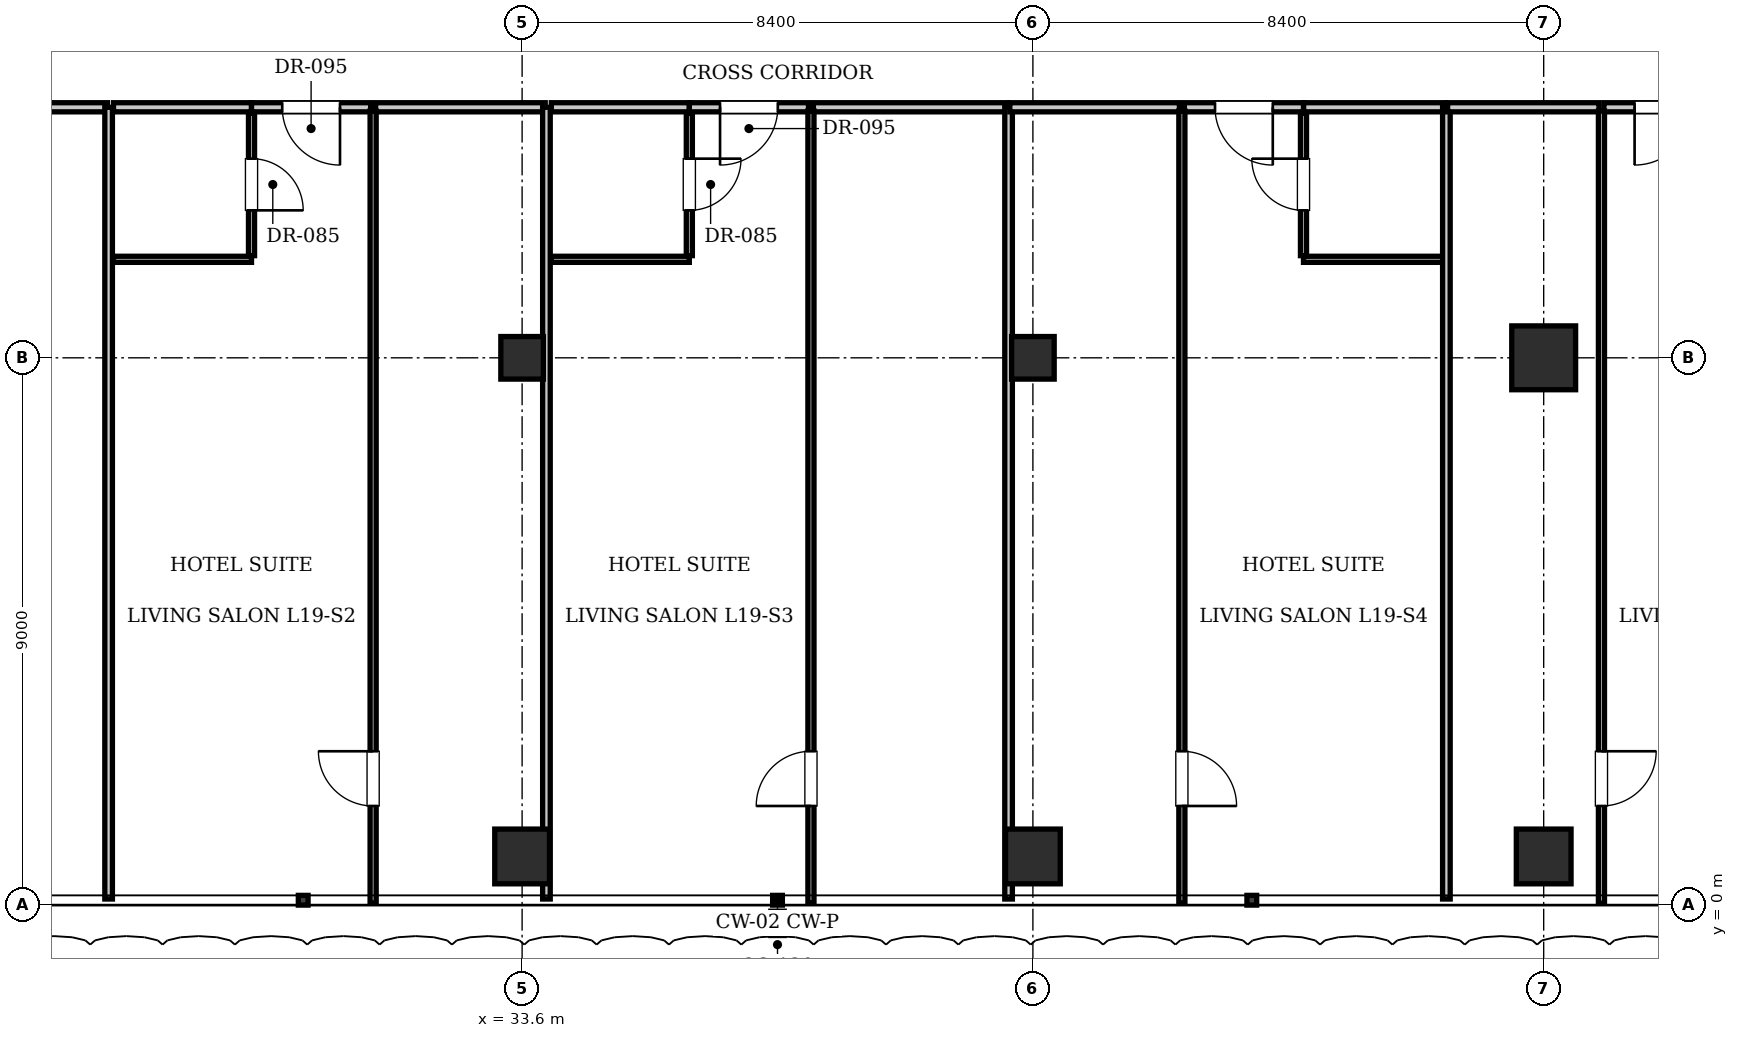
"""IFC4 building model, lengths in metres.
Left out: names, types, materials, properties, quantities, classifications, styles, units other than length and angle.
Written with IfcOpenShell. Run it as: python <this file> out.ifc"""

import sys

from ifc_helpers import new_model, si_unit, direction, frame, frame_2d, origin, origin_2d, place, context, subcontext, project, spatial, rectangle, i_section, extrude, element, fill, save


model = new_model("IFC4")
c1 = context("Model", 3, precision=1e-05, world=origin(), true_north=direction((0.0, 1.0)))
c2 = subcontext(c1, "Body", "Model", "MODEL_VIEW")
j1 = project(units=[si_unit("LENGTHUNIT", "METRE"), si_unit("PLANEANGLEUNIT", "RADIAN")], contexts=[c1])
p1 = place(None, origin())
s1 = spatial("IfcSite", under=j1, at=p1, CompositionType="ELEMENT")
p2 = place(p1, origin())
s2 = spatial("IfcBuilding", under=s1, at=p2, CompositionType="ELEMENT")
p3 = place(p2, frame((0.0, 0.0, 80.85)))
s3 = spatial("IfcBuildingStorey", under=s2, at=p3, CompositionType="ELEMENT", Elevation=80.85)
p4 = place(p3, frame((50.4, 9.0, 0.0), z_axis=(0.0, 0.0, 1.0), x_axis=(1.0, 0.0, 0.0)))
e1 = element("IfcColumn", 1, at=p4, inside=s3, PredefinedType="COLUMN", context=c2, shape_type="SweptSolid", body=[
    extrude(rectangle(XDim=1.05, YDim=1.05, at=origin_2d()), origin(), (0.0, 0.0, 1.0), 3.85),
])
for number, where, z_axis, x_axis in (
    (2, (33.6, 9.0, 0.0), (0.0, 0.0, 1.0), (1.0, 0.0, 0.0)),
    (3, (42.0, 9.0, 0.0), (0.0, 0.0, 1.0), (1.0, 0.0, 0.0)),
):
    element("IfcColumn", number, at=place(p3, frame(where, z_axis=z_axis, x_axis=x_axis)), inside=s3, PredefinedType="COLUMN", context=c2, shape_type="SweptSolid", body=[
        extrude(i_section(OverallWidth=0.7, OverallDepth=0.7, WebThickness=0.028, FlangeThickness=0.044, at=origin_2d()), origin(), (0.0, 0.0, 1.0), 3.85),
    ])
for number, where, z_axis, x_axis in (
    (4, (33.6, 0.8, 0.0), (0.0, 0.0, 1.0), (1.0, 0.0, 0.0)),
    (5, (42.0, 0.8, 0.0), (0.0, 0.0, 1.0), (1.0, 0.0, 0.0)),
    (6, (50.4, 0.8, 0.0), (0.0, 0.0, 1.0), (1.0, 0.0, 0.0)),
):
    element("IfcColumn", number, at=place(p3, frame(where, z_axis=z_axis, x_axis=x_axis)), inside=s3, PredefinedType="COLUMN", context=c2, shape_type="SweptSolid", body=[
        extrude(rectangle(XDim=0.9, YDim=0.9, at=origin_2d()), origin(), (0.0, 0.0, 1.0), 3.85),
    ])
p5 = place(p3, frame((24.29, 13.12, 0.0), z_axis=(0.0, 0.0, 1.0), x_axis=(1.0, 0.0, 0.0)))
e7 = element("IfcWall", 7, at=p5, inside=s3, PredefinedType="PARTITIONING", context=c2, shape_type="SweptSolid", body=[
    extrude(rectangle(XDim=2.49, YDim=0.15, at=frame_2d((1.245, 0.0))), origin(), (0.0, 0.0, 1.0), 3.61),
])
p6 = place(p3, frame((26.8, 0.1, 0.0), z_axis=(0.0, 0.0, 1.0), x_axis=(0.0, 1.0, 0.0)))
e8 = element("IfcWall", 8, at=p6, inside=s3, PredefinedType="PARTITIONING", context=c2, shape_type="SweptSolid", body=[
    extrude(rectangle(XDim=13.02, YDim=0.125, at=frame_2d((6.51, 0.0))), origin(), (0.0, 0.0, 1.0), 3.61),
])
p7 = place(p3, frame((26.88, 13.12, 0.0), z_axis=(0.0, 0.0, 1.0), x_axis=(1.0, 0.0, 0.0)))
e9 = element("IfcWall", 9, at=p7, inside=s3, PredefinedType="PARTITIONING", context=c2, shape_type="SweptSolid", body=[
    extrude(rectangle(XDim=2.27, YDim=0.15, at=frame_2d((1.135, 0.0))), origin(), (0.0, 0.0, 1.0), 3.61),
])
p8 = place(p3, frame((26.88, 10.62, 0.0), z_axis=(0.0, 0.0, 1.0), x_axis=(1.0, 0.0, 0.0)))
e10 = element("IfcWall", 10, at=p8, inside=s3, PredefinedType="PARTITIONING", context=c2, shape_type="SweptSolid", body=[
    extrude(rectangle(XDim=2.27, YDim=0.1, at=frame_2d((1.135, 0.0))), origin(), (0.0, 0.0, 1.0), 3.61),
])
p9 = place(p3, frame((29.15, 10.68, 0.0), z_axis=(0.0, 0.0, 1.0), x_axis=(0.0, 1.0, 0.0)))
e11 = element("IfcWall", 11, at=p9, inside=s3, PredefinedType="PARTITIONING", context=c2, shape_type="SweptSolid", body=[
    extrude(rectangle(XDim=2.34, YDim=0.1, at=frame_2d((1.17, 0.0))), origin(), (0.0, 0.0, 1.0), 3.61),
])
p10 = place(p9, frame((0.745, 0.0, 0.0)))
e12 = element("IfcOpeningElement", 12, at=p10, cuts=e11, PredefinedType="OPENING", context=c2, shape_type="SweptSolid", body=[
    extrude(rectangle(XDim=0.85, YDim=2.1, at=frame_2d((0.425, 1.05))), frame((0.0, 0.06, 0.0), z_axis=(0.0, -1.0, 0.0), x_axis=(1.0, 0.0, 0.0)), (0.0, 0.0, 1.0), 0.12),
])
p11 = place(p3, frame((29.15, 13.12, 0.0), z_axis=(0.0, 0.0, 1.0), x_axis=(1.0, 0.0, 0.0)))
e13 = element("IfcWall", 13, at=p11, inside=s3, PredefinedType="PARTITIONING", context=c2, shape_type="SweptSolid", body=[
    extrude(rectangle(XDim=1.96, YDim=0.15, at=frame_2d((0.98, 0.0))), origin(), (0.0, 0.0, 1.0), 3.61),
])
p12 = place(p11, frame((0.505, 0.0, 0.0)))
e14 = element("IfcOpeningElement", 14, at=p12, cuts=e13, PredefinedType="OPENING", context=c2, shape_type="SweptSolid", body=[
    extrude(rectangle(XDim=0.95, YDim=2.15, at=frame_2d((0.475, 1.075))), frame((0.0, 0.085, 0.0), z_axis=(0.0, -1.0, 0.0), x_axis=(1.0, 0.0, 0.0)), (0.0, 0.0, 1.0), 0.17),
])
p13 = place(p3, frame((31.19, 13.12, 0.0), z_axis=(0.0, 0.0, 1.0), x_axis=(1.0, 0.0, 0.0)))
e15 = element("IfcWall", 15, at=p13, inside=s3, PredefinedType="PARTITIONING", context=c2, shape_type="SweptSolid", body=[
    extrude(rectangle(XDim=2.79, YDim=0.15, at=frame_2d((1.395, 0.0))), origin(), (0.0, 0.0, 1.0), 3.61),
])
p14 = place(p3, frame((31.15, 0.03, 0.0), z_axis=(0.0, 0.0, 1.0), x_axis=(0.0, 1.0, 0.0)))
e16 = element("IfcWall", 16, at=p14, inside=s3, PredefinedType="PARTITIONING", context=c2, shape_type="SweptSolid", body=[
    extrude(rectangle(XDim=13.03, YDim=0.1, at=frame_2d((6.515, 0.0))), origin(), (0.0, 0.0, 1.0), 3.61),
])
p15 = place(p14, frame((1.6, 0.0, 0.0)))
e17 = element("IfcOpeningElement", 17, at=p15, cuts=e16, PredefinedType="OPENING", context=c2, shape_type="SweptSolid", body=[
    extrude(rectangle(XDim=0.9, YDim=2.1, at=frame_2d((0.45, 1.05))), frame((0.0, 0.06, 0.0), z_axis=(0.0, -1.0, 0.0), x_axis=(1.0, 0.0, 0.0)), (0.0, 0.0, 1.0), 0.12),
])
p16 = place(p3, frame((34.0, 0.1, 0.0), z_axis=(0.0, 0.0, 1.0), x_axis=(0.0, 1.0, 0.0)))
e18 = element("IfcWall", 18, at=p16, inside=s3, PredefinedType="PARTITIONING", context=c2, shape_type="SweptSolid", body=[
    extrude(rectangle(XDim=13.02, YDim=0.125, at=frame_2d((6.51, 0.0))), origin(), (0.0, 0.0, 1.0), 3.61),
])
p17 = place(p3, frame((34.08, 13.12, 0.0), z_axis=(0.0, 0.0, 1.0), x_axis=(1.0, 0.0, 0.0)))
e19 = element("IfcWall", 19, at=p17, inside=s3, PredefinedType="PARTITIONING", context=c2, shape_type="SweptSolid", body=[
    extrude(rectangle(XDim=2.27, YDim=0.15, at=frame_2d((1.135, 0.0))), origin(), (0.0, 0.0, 1.0), 3.61),
])
p18 = place(p3, frame((34.08, 10.62, 0.0), z_axis=(0.0, 0.0, 1.0), x_axis=(1.0, 0.0, 0.0)))
e20 = element("IfcWall", 20, at=p18, inside=s3, PredefinedType="PARTITIONING", context=c2, shape_type="SweptSolid", body=[
    extrude(rectangle(XDim=2.27, YDim=0.1, at=frame_2d((1.135, 0.0))), origin(), (0.0, 0.0, 1.0), 3.61),
])
p19 = place(p3, frame((36.35, 10.68, 0.0), z_axis=(0.0, 0.0, 1.0), x_axis=(0.0, 1.0, 0.0)))
e21 = element("IfcWall", 21, at=p19, inside=s3, PredefinedType="PARTITIONING", context=c2, shape_type="SweptSolid", body=[
    extrude(rectangle(XDim=2.34, YDim=0.1, at=frame_2d((1.17, 0.0))), origin(), (0.0, 0.0, 1.0), 3.61),
])
p20 = place(p19, frame((0.745, 0.0, 0.0)))
e22 = element("IfcOpeningElement", 22, at=p20, cuts=e21, PredefinedType="OPENING", context=c2, shape_type="SweptSolid", body=[
    extrude(rectangle(XDim=0.85, YDim=2.1, at=frame_2d((0.425, 1.05))), frame((0.0, 0.06, 0.0), z_axis=(0.0, -1.0, 0.0), x_axis=(1.0, 0.0, 0.0)), (0.0, 0.0, 1.0), 0.12),
])
p21 = place(p3, frame((36.35, 13.12, 0.0), z_axis=(0.0, 0.0, 1.0), x_axis=(1.0, 0.0, 0.0)))
e23 = element("IfcWall", 23, at=p21, inside=s3, PredefinedType="PARTITIONING", context=c2, shape_type="SweptSolid", body=[
    extrude(rectangle(XDim=1.96, YDim=0.15, at=frame_2d((0.98, 0.0))), origin(), (0.0, 0.0, 1.0), 3.61),
])
p22 = place(p21, frame((0.505, 0.0, 0.0)))
e24 = element("IfcOpeningElement", 24, at=p22, cuts=e23, PredefinedType="OPENING", context=c2, shape_type="SweptSolid", body=[
    extrude(rectangle(XDim=0.95, YDim=2.15, at=frame_2d((0.475, 1.075))), frame((0.0, 0.085, 0.0), z_axis=(0.0, -1.0, 0.0), x_axis=(1.0, 0.0, 0.0)), (0.0, 0.0, 1.0), 0.17),
])
p23 = place(p3, frame((38.39, 13.12, 0.0), z_axis=(0.0, 0.0, 1.0), x_axis=(1.0, 0.0, 0.0)))
e25 = element("IfcWall", 25, at=p23, inside=s3, PredefinedType="PARTITIONING", context=c2, shape_type="SweptSolid", body=[
    extrude(rectangle(XDim=3.19, YDim=0.15, at=frame_2d((1.595, 0.0))), origin(), (0.0, 0.0, 1.0), 3.61),
])
p24 = place(p3, frame((38.35, 0.03, 0.0), z_axis=(0.0, 0.0, 1.0), x_axis=(0.0, 1.0, 0.0)))
e26 = element("IfcWall", 26, at=p24, inside=s3, PredefinedType="PARTITIONING", context=c2, shape_type="SweptSolid", body=[
    extrude(rectangle(XDim=13.03, YDim=0.1, at=frame_2d((6.515, 0.0))), origin(), (0.0, 0.0, 1.0), 3.61),
])
p25 = place(p24, frame((1.6, 0.0, 0.0)))
e27 = element("IfcOpeningElement", 27, at=p25, cuts=e26, PredefinedType="OPENING", context=c2, shape_type="SweptSolid", body=[
    extrude(rectangle(XDim=0.9, YDim=2.1, at=frame_2d((0.45, 1.05))), frame((0.0, 0.06, 0.0), z_axis=(0.0, -1.0, 0.0), x_axis=(1.0, 0.0, 0.0)), (0.0, 0.0, 1.0), 0.12),
])
p26 = place(p3, frame((41.6, 0.1, 0.0), z_axis=(0.0, 0.0, 1.0), x_axis=(0.0, 1.0, 0.0)))
e28 = element("IfcWall", 28, at=p26, inside=s3, PredefinedType="PARTITIONING", context=c2, shape_type="SweptSolid", body=[
    extrude(rectangle(XDim=13.02, YDim=0.125, at=frame_2d((6.51, 0.0))), origin(), (0.0, 0.0, 1.0), 3.61),
])
p27 = place(p3, frame((46.45, 13.12, 0.0), z_axis=(0.0, 0.0, 1.0), x_axis=(1.0, 0.0, 0.0)))
e29 = element("IfcWall", 29, at=p27, inside=s3, PredefinedType="PARTITIONING", context=c2, shape_type="SweptSolid", body=[
    extrude(rectangle(XDim=2.33, YDim=0.15, at=frame_2d((1.165, 0.0))), origin(), (0.0, 0.0, 1.0), 3.61),
])
p28 = place(p3, frame((46.45, 10.62, 0.0), z_axis=(0.0, 0.0, 1.0), x_axis=(1.0, 0.0, 0.0)))
e30 = element("IfcWall", 30, at=p28, inside=s3, PredefinedType="PARTITIONING", context=c2, shape_type="SweptSolid", body=[
    extrude(rectangle(XDim=2.31, YDim=0.1, at=frame_2d((1.155, 0.0))), origin(), (0.0, 0.0, 1.0), 3.61),
])
p29 = place(p3, frame((46.45, 10.68, 0.0), z_axis=(0.0, 0.0, 1.0), x_axis=(0.0, 1.0, 0.0)))
e31 = element("IfcWall", 31, at=p29, inside=s3, PredefinedType="PARTITIONING", context=c2, shape_type="SweptSolid", body=[
    extrude(rectangle(XDim=2.34, YDim=0.1, at=frame_2d((1.17, 0.0))), origin(), (0.0, 0.0, 1.0), 3.61),
])
p30 = place(p29, frame((0.745, 0.0, 0.0)))
e32 = element("IfcOpeningElement", 32, at=p30, cuts=e31, PredefinedType="OPENING", context=c2, shape_type="SweptSolid", body=[
    extrude(rectangle(XDim=0.85, YDim=2.1, at=frame_2d((0.425, 1.05))), frame((0.0, 0.06, 0.0), z_axis=(0.0, -1.0, 0.0), x_axis=(1.0, 0.0, 0.0)), (0.0, 0.0, 1.0), 0.12),
])
p31 = place(p3, frame((41.62, 13.12, 0.0), z_axis=(0.0, 0.0, 1.0), x_axis=(1.0, 0.0, 0.0)))
e33 = element("IfcWall", 33, at=p31, inside=s3, PredefinedType="PARTITIONING", context=c2, shape_type="SweptSolid", body=[
    extrude(rectangle(XDim=2.79, YDim=0.15, at=frame_2d((1.395, 0.0))), origin(), (0.0, 0.0, 1.0), 3.61),
])
p32 = place(p3, frame((44.49, 13.12, 0.0), z_axis=(0.0, 0.0, 1.0), x_axis=(1.0, 0.0, 0.0)))
e34 = element("IfcWall", 34, at=p32, inside=s3, PredefinedType="PARTITIONING", context=c2, shape_type="SweptSolid", body=[
    extrude(rectangle(XDim=1.96, YDim=0.15, at=frame_2d((0.98, 0.0))), origin(), (0.0, 0.0, 1.0), 3.61),
])
p33 = place(p32, frame((0.505, 0.0, 0.0)))
e35 = element("IfcOpeningElement", 35, at=p33, cuts=e34, PredefinedType="OPENING", context=c2, shape_type="SweptSolid", body=[
    extrude(rectangle(XDim=0.95, YDim=2.15, at=frame_2d((0.475, 1.075))), frame((0.0, 0.085, 0.0), z_axis=(0.0, -1.0, 0.0), x_axis=(1.0, 0.0, 0.0)), (0.0, 0.0, 1.0), 0.17),
])
p34 = place(p3, frame((44.45, 0.03, 0.0), z_axis=(0.0, 0.0, 1.0), x_axis=(0.0, 1.0, 0.0)))
e36 = element("IfcWall", 36, at=p34, inside=s3, PredefinedType="PARTITIONING", context=c2, shape_type="SweptSolid", body=[
    extrude(rectangle(XDim=13.03, YDim=0.1, at=frame_2d((6.515, 0.0))), origin(), (0.0, 0.0, 1.0), 3.61),
])
p35 = place(p34, frame((1.6, 0.0, 0.0)))
e37 = element("IfcOpeningElement", 37, at=p35, cuts=e36, PredefinedType="OPENING", context=c2, shape_type="SweptSolid", body=[
    extrude(rectangle(XDim=0.9, YDim=2.1, at=frame_2d((0.45, 1.05))), frame((0.0, 0.06, 0.0), z_axis=(0.0, -1.0, 0.0), x_axis=(1.0, 0.0, 0.0)), (0.0, 0.0, 1.0), 0.12),
])
p36 = place(p3, frame((48.8, 0.1, 0.0), z_axis=(0.0, 0.0, 1.0), x_axis=(0.0, 1.0, 0.0)))
e38 = element("IfcWall", 38, at=p36, inside=s3, PredefinedType="PARTITIONING", context=c2, shape_type="SweptSolid", body=[
    extrude(rectangle(XDim=13.02, YDim=0.125, at=frame_2d((6.51, 0.0))), origin(), (0.0, 0.0, 1.0), 3.61),
])
p37 = place(p3, frame((48.82, 13.12, 0.0), z_axis=(0.0, 0.0, 1.0), x_axis=(1.0, 0.0, 0.0)))
e39 = element("IfcWall", 39, at=p37, inside=s3, PredefinedType="PARTITIONING", context=c2, shape_type="SweptSolid", body=[
    extrude(rectangle(XDim=2.49, YDim=0.15, at=frame_2d((1.245, 0.0))), origin(), (0.0, 0.0, 1.0), 3.61),
])
p38 = place(p3, frame((51.39, 13.12, 0.0), z_axis=(0.0, 0.0, 1.0), x_axis=(1.0, 0.0, 0.0)))
e40 = element("IfcWall", 40, at=p38, inside=s3, PredefinedType="PARTITIONING", context=c2, shape_type="SweptSolid", body=[
    extrude(rectangle(XDim=1.96, YDim=0.15, at=frame_2d((0.98, 0.0))), origin(), (0.0, 0.0, 1.0), 3.61),
])
p39 = place(p38, frame((0.505, 0.0, 0.0)))
e41 = element("IfcOpeningElement", 41, at=p39, cuts=e40, PredefinedType="OPENING", context=c2, shape_type="SweptSolid", body=[
    extrude(rectangle(XDim=0.95, YDim=2.15, at=frame_2d((0.475, 1.075))), frame((0.0, 0.085, 0.0), z_axis=(0.0, -1.0, 0.0), x_axis=(1.0, 0.0, 0.0)), (0.0, 0.0, 1.0), 0.17),
])
p40 = place(p3, frame((51.35, 0.03, 0.0), z_axis=(0.0, 0.0, 1.0), x_axis=(0.0, 1.0, 0.0)))
e42 = element("IfcWall", 42, at=p40, inside=s3, PredefinedType="PARTITIONING", context=c2, shape_type="SweptSolid", body=[
    extrude(rectangle(XDim=13.03, YDim=0.1, at=frame_2d((6.515, 0.0))), origin(), (0.0, 0.0, 1.0), 3.61),
])
p41 = place(p40, frame((1.6, 0.0, 0.0)))
e43 = element("IfcOpeningElement", 43, at=p41, cuts=e42, PredefinedType="OPENING", context=c2, shape_type="SweptSolid", body=[
    extrude(rectangle(XDim=0.9, YDim=2.1, at=frame_2d((0.45, 1.05))), frame((0.0, 0.06, 0.0), z_axis=(0.0, -1.0, 0.0), x_axis=(1.0, 0.0, 0.0)), (0.0, 0.0, 1.0), 0.12),
])
p42 = place(p10, frame((0.85, 0.0, 0.0), z_axis=(0.0, 0.0, 1.0), x_axis=(-1.0, 0.0, 0.0)))
e44 = element("IfcDoor", 44, at=p42, inside=s3, OperationType="SINGLE_SWING_RIGHT", PredefinedType="DOOR", context=c2, shape_type="SweptSolid", body=[
    extrude(rectangle(XDim=0.85, YDim=2.1, at=frame_2d((0.425, 1.05))), frame((0.0, 0.025, 0.0), z_axis=(0.0, -1.0, 0.0), x_axis=(1.0, 0.0, 0.0)), (0.0, 0.0, 1.0), 0.05),
])
fill(e12, e44)
p43 = place(p12, frame((0.95, 0.0, 0.0), z_axis=(0.0, 0.0, 1.0), x_axis=(-1.0, 0.0, 0.0)))
e45 = element("IfcDoor", 45, at=p43, inside=s3, OperationType="SINGLE_SWING_LEFT", PredefinedType="DOOR", context=c2, shape_type="SweptSolid", body=[
    extrude(rectangle(XDim=0.95, YDim=2.15, at=frame_2d((0.475, 1.075))), frame((0.0, 0.025, 0.0), z_axis=(0.0, -1.0, 0.0), x_axis=(1.0, 0.0, 0.0)), (0.0, 0.0, 1.0), 0.05),
])
fill(e14, e45)
p44 = place(p15, origin())
e46 = element("IfcDoor", 46, at=p44, inside=s3, OperationType="SINGLE_SWING_RIGHT", PredefinedType="DOOR", context=c2, shape_type="SweptSolid", body=[
    extrude(rectangle(XDim=0.9, YDim=2.1, at=frame_2d((0.45, 1.05))), frame((0.0, 0.025, 0.0), z_axis=(0.0, -1.0, 0.0), x_axis=(1.0, 0.0, 0.0)), (0.0, 0.0, 1.0), 0.05),
])
fill(e17, e46)
p45 = place(p20, frame((0.85, 0.0, 0.0), z_axis=(0.0, 0.0, 1.0), x_axis=(-1.0, 0.0, 0.0)))
e47 = element("IfcDoor", 47, at=p45, inside=s3, OperationType="SINGLE_SWING_LEFT", PredefinedType="DOOR", context=c2, shape_type="SweptSolid", body=[
    extrude(rectangle(XDim=0.85, YDim=2.1, at=frame_2d((0.425, 1.05))), frame((0.0, 0.025, 0.0), z_axis=(0.0, -1.0, 0.0), x_axis=(1.0, 0.0, 0.0)), (0.0, 0.0, 1.0), 0.05),
])
fill(e22, e47)
p46 = place(p22, frame((0.95, 0.0, 0.0), z_axis=(0.0, 0.0, 1.0), x_axis=(-1.0, 0.0, 0.0)))
e48 = element("IfcDoor", 48, at=p46, inside=s3, OperationType="SINGLE_SWING_RIGHT", PredefinedType="DOOR", context=c2, shape_type="SweptSolid", body=[
    extrude(rectangle(XDim=0.95, YDim=2.15, at=frame_2d((0.475, 1.075))), frame((0.0, 0.025, 0.0), z_axis=(0.0, -1.0, 0.0), x_axis=(1.0, 0.0, 0.0)), (0.0, 0.0, 1.0), 0.05),
])
fill(e24, e48)
p47 = place(p25, origin())
e49 = element("IfcDoor", 49, at=p47, inside=s3, OperationType="SINGLE_SWING_LEFT", PredefinedType="DOOR", context=c2, shape_type="SweptSolid", body=[
    extrude(rectangle(XDim=0.9, YDim=2.1, at=frame_2d((0.45, 1.05))), frame((0.0, 0.025, 0.0), z_axis=(0.0, -1.0, 0.0), x_axis=(1.0, 0.0, 0.0)), (0.0, 0.0, 1.0), 0.05),
])
fill(e27, e49)
p48 = place(p30, origin())
e50 = element("IfcDoor", 50, at=p48, inside=s3, OperationType="SINGLE_SWING_RIGHT", PredefinedType="DOOR", context=c2, shape_type="SweptSolid", body=[
    extrude(rectangle(XDim=0.85, YDim=2.1, at=frame_2d((0.425, 1.05))), frame((0.0, 0.025, 0.0), z_axis=(0.0, -1.0, 0.0), x_axis=(1.0, 0.0, 0.0)), (0.0, 0.0, 1.0), 0.05),
])
fill(e32, e50)
p49 = place(p33, frame((0.95, 0.0, 0.0), z_axis=(0.0, 0.0, 1.0), x_axis=(-1.0, 0.0, 0.0)))
e51 = element("IfcDoor", 51, at=p49, inside=s3, OperationType="SINGLE_SWING_LEFT", PredefinedType="DOOR", context=c2, shape_type="SweptSolid", body=[
    extrude(rectangle(XDim=0.95, YDim=2.15, at=frame_2d((0.475, 1.075))), frame((0.0, 0.025, 0.0), z_axis=(0.0, -1.0, 0.0), x_axis=(1.0, 0.0, 0.0)), (0.0, 0.0, 1.0), 0.05),
])
fill(e35, e51)
p50 = place(p35, frame((0.9, 0.0, 0.0), z_axis=(0.0, 0.0, 1.0), x_axis=(-1.0, 0.0, 0.0)))
e52 = element("IfcDoor", 52, at=p50, inside=s3, OperationType="SINGLE_SWING_RIGHT", PredefinedType="DOOR", context=c2, shape_type="SweptSolid", body=[
    extrude(rectangle(XDim=0.9, YDim=2.1, at=frame_2d((0.45, 1.05))), frame((0.0, 0.025, 0.0), z_axis=(0.0, -1.0, 0.0), x_axis=(1.0, 0.0, 0.0)), (0.0, 0.0, 1.0), 0.05),
])
fill(e37, e52)
p51 = place(p39, frame((0.95, 0.0, 0.0), z_axis=(0.0, 0.0, 1.0), x_axis=(-1.0, 0.0, 0.0)))
e53 = element("IfcDoor", 53, at=p51, inside=s3, OperationType="SINGLE_SWING_RIGHT", PredefinedType="DOOR", context=c2, shape_type="SweptSolid", body=[
    extrude(rectangle(XDim=0.95, YDim=2.15, at=frame_2d((0.475, 1.075))), frame((0.0, 0.025, 0.0), z_axis=(0.0, -1.0, 0.0), x_axis=(1.0, 0.0, 0.0)), (0.0, 0.0, 1.0), 0.05),
])
fill(e41, e53)
p52 = place(p41, frame((0.9, 0.0, 0.0), z_axis=(0.0, 0.0, 1.0), x_axis=(-1.0, 0.0, 0.0)))
e54 = element("IfcDoor", 54, at=p52, inside=s3, OperationType="SINGLE_SWING_LEFT", PredefinedType="DOOR", context=c2, shape_type="SweptSolid", body=[
    extrude(rectangle(XDim=0.9, YDim=2.1, at=frame_2d((0.45, 1.05))), frame((0.0, 0.025, 0.0), z_axis=(0.0, -1.0, 0.0), x_axis=(1.0, 0.0, 0.0)), (0.0, 0.0, 1.0), 0.05),
])
fill(e43, e54)
save(model, sys.argv[1])
